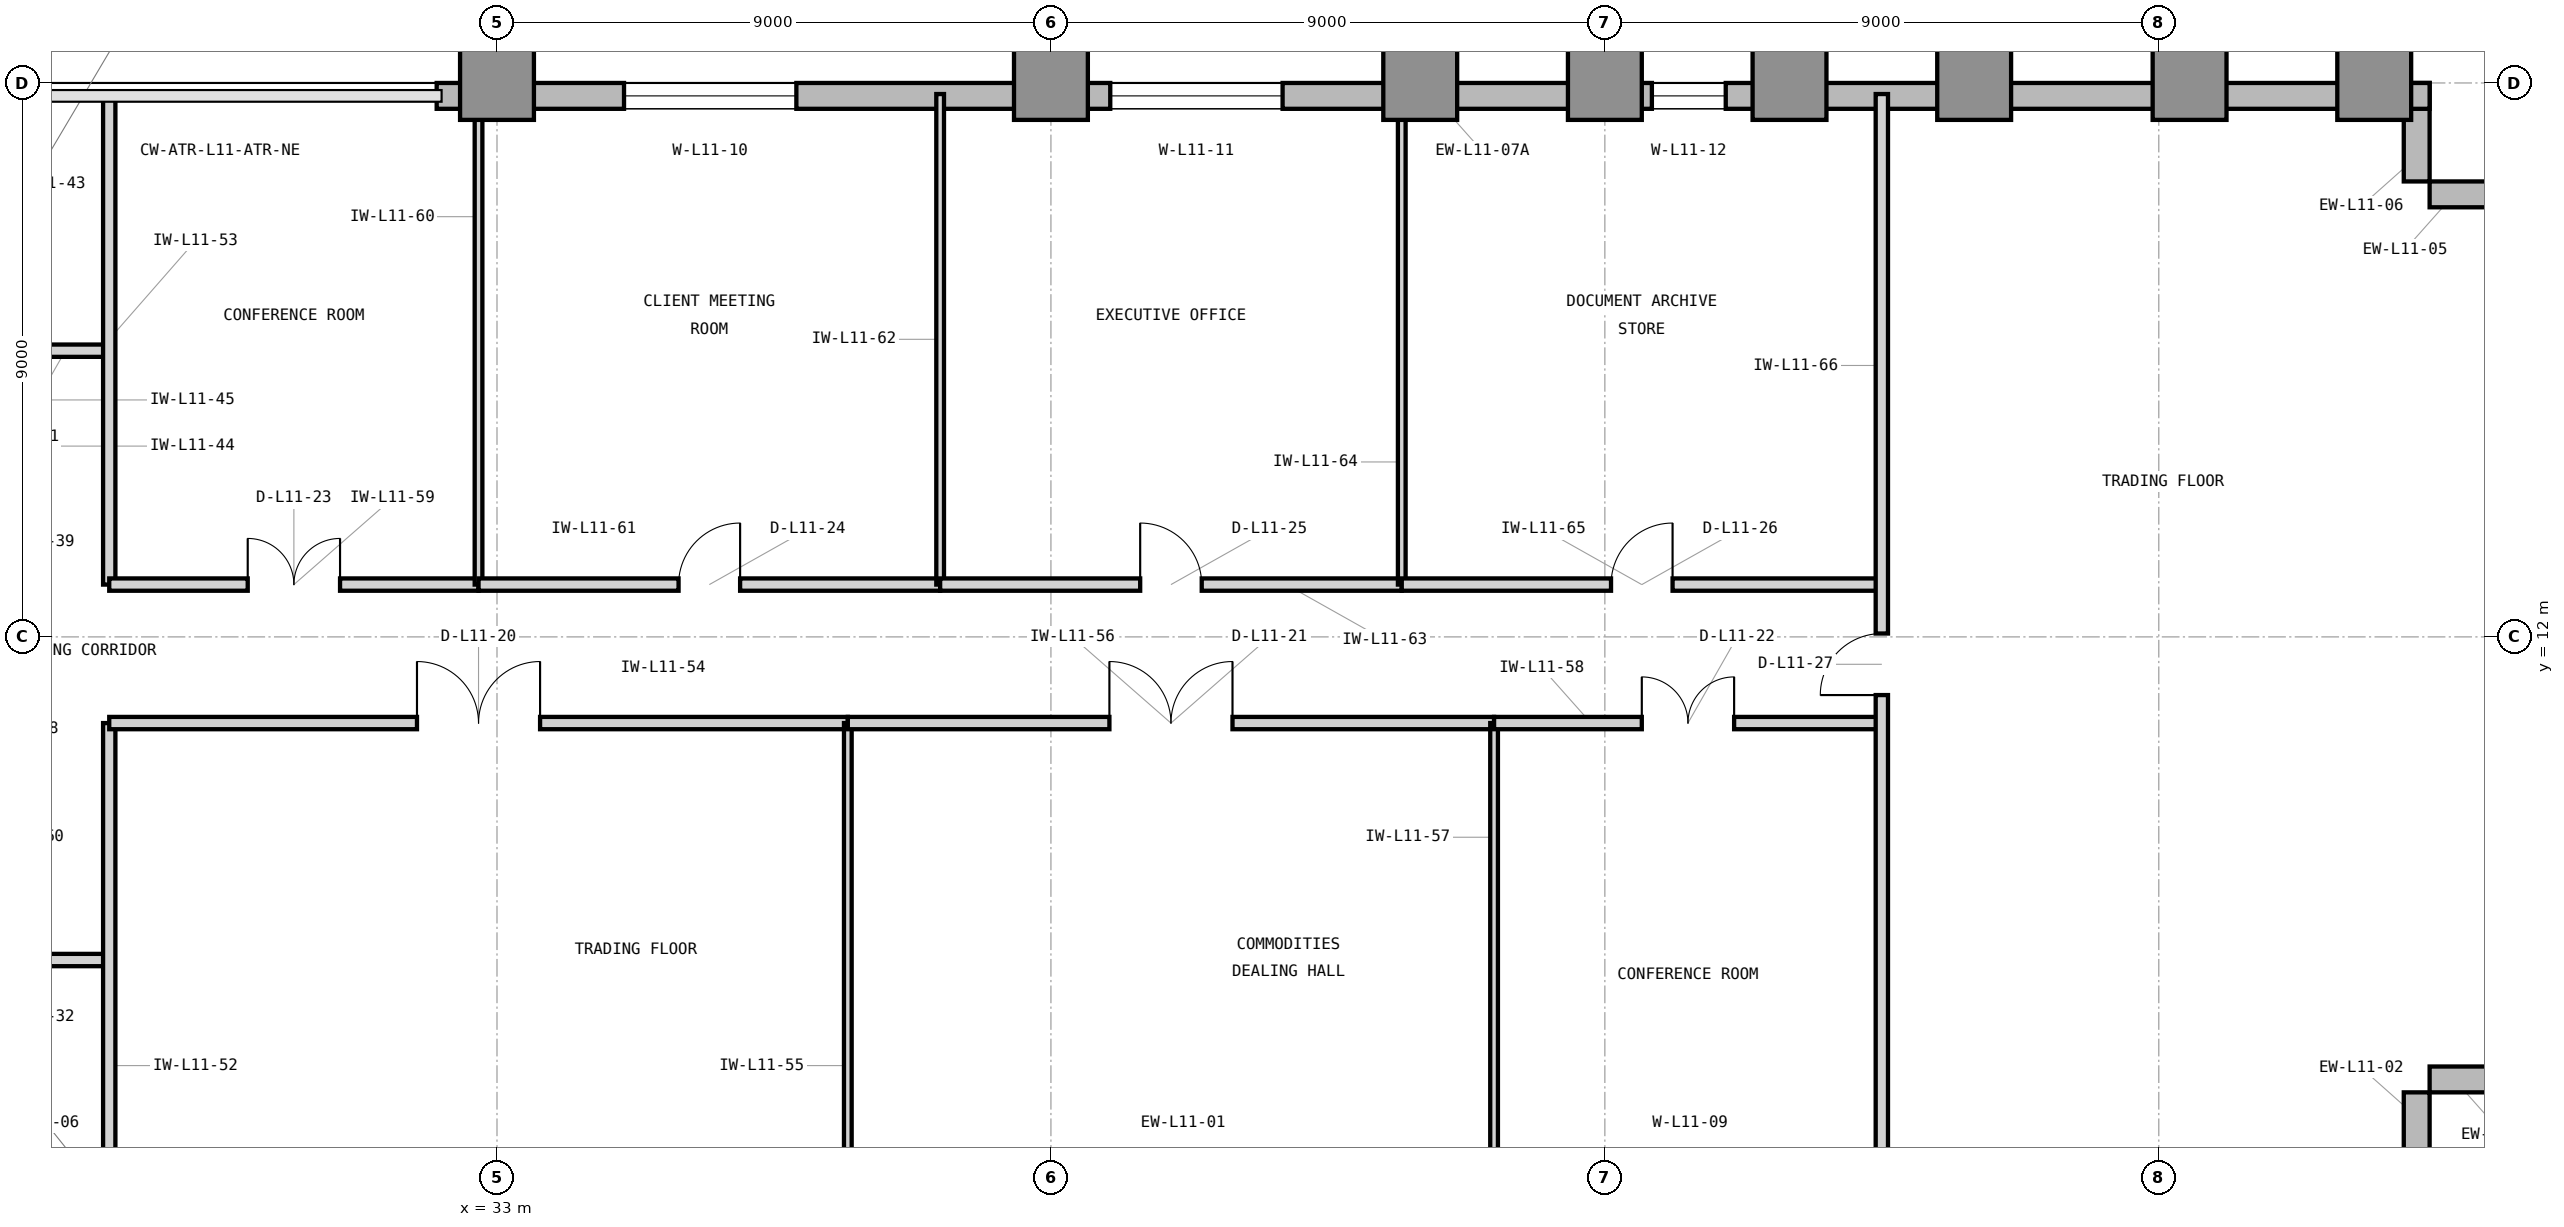
"""IFC4 building model, lengths in metres.
Left out: names, types, materials, properties, quantities, classifications, styles, units other than length and angle.
Written with IfcOpenShell. Run it as: python <this file> out.ifc"""

import sys

from ifc_helpers import new_model, si_unit, direction, frame, frame_2d, origin, origin_2d, place, context, subcontext, project, spatial, rectangle, extrude, element, fill, save


model = new_model("IFC4")
c1 = context("Model", 3, precision=1e-05, world=origin(), true_north=direction((0.0, 1.0)))
c2 = subcontext(c1, "Body", "Model", "MODEL_VIEW")
j1 = project(units=[si_unit("LENGTHUNIT", "METRE"), si_unit("PLANEANGLEUNIT", "RADIAN")], contexts=[c1])
p1 = place(None, origin())
s1 = spatial("IfcSite", under=j1, at=p1, CompositionType="ELEMENT")
p2 = place(p1, origin())
s2 = spatial("IfcBuilding", under=s1, at=p2, CompositionType="ELEMENT")
p3 = place(p2, frame((0.0, 0.0, 51.0)))
s3 = spatial("IfcBuildingStorey", under=s2, at=p3, CompositionType="ELEMENT", Elevation=51.0)
for number, where, z_axis, x_axis in (
    (1, (33.0, 21.0, 0.0), (0.0, 0.0, 1.0), (1.0, 0.0, 0.0)),
    (2, (42.0, 21.0, 0.0), (0.0, 0.0, 1.0), (1.0, 0.0, 0.0)),
    (3, (48.0, 21.0, 0.0), (0.0, 0.0, 1.0), (1.0, 0.0, 0.0)),
    (4, (51.0, 21.0, 0.0), (0.0, 0.0, 1.0), (1.0, 0.0, 0.0)),
    (5, (54.0, 21.0, 0.0), (0.0, 0.0, 1.0), (1.0, 0.0, 0.0)),
    (6, (57.0, 21.0, 0.0), (0.0, 0.0, 1.0), (1.0, 0.0, 0.0)),
    (7, (60.5, 21.0, 0.0), (0.0, 0.0, 1.0), (1.0, 0.0, 0.0)),
    (8, (63.5, 21.0, 0.0), (0.0, 0.0, 1.0), (1.0, 0.0, 0.0)),
):
    element("IfcColumn", number, at=place(p3, frame(where, z_axis=z_axis, x_axis=x_axis)), inside=s3, PredefinedType="COLUMN", context=c2, shape_type="SweptSolid", body=[
        extrude(rectangle(XDim=1.2, YDim=1.2, at=origin_2d()), origin(), (0.0, 0.0, 1.0), 4.2),
    ])
for number, where, z_axis, x_axis in (
    (9, (64.19, 3.0, 0.0), (0.0, 0.0, 1.0), (0.0, 1.0, 0.0)),
    (10, (64.4, 4.81, 0.0), (0.0, 0.0, 1.0), (1.0, 0.0, 0.0)),
    (11, (66.0, 19.19, 0.0), (0.0, 0.0, 1.0), (-1.0, 0.0, 0.0)),
    (12, (64.19, 19.4, 0.0), (0.0, 0.0, 1.0), (0.0, 1.0, 0.0)),
):
    element("IfcWall", number, at=place(p3, frame(where, z_axis=z_axis, x_axis=x_axis)), inside=s3, PredefinedType="STANDARD", context=c2, shape_type="SweptSolid", body=[
        extrude(rectangle(XDim=1.6, YDim=0.42, at=frame_2d((0.8, 0.0))), origin(), (0.0, 0.0, 1.0), 3.98),
    ])
p4 = place(p3, frame((64.4, 20.79, 0.0), z_axis=(0.0, 0.0, 1.0), x_axis=(-1.0, 0.0, 0.0)))
e13 = element("IfcWall", 13, at=p4, inside=s3, PredefinedType="STANDARD", context=c2, shape_type="SweptSolid", body=[
    extrude(rectangle(XDim=32.38, YDim=0.42, at=frame_2d((16.19, 0.0))), origin(), (0.0, 0.0, 1.0), 3.98),
])
p5 = place(p4, frame((26.536, 0.0, 0.85)))
e14 = element("IfcOpeningElement", 14, at=p5, cuts=e13, PredefinedType="OPENING", context=c2, shape_type="SweptSolid", body=[
    extrude(rectangle(XDim=2.8, YDim=2.45, at=frame_2d((1.4, 1.225))), frame((0.0, 0.22, 0.0), z_axis=(0.0, -1.0, 0.0), x_axis=(1.0, 0.0, 0.0)), (0.0, 0.0, 1.0), 0.44),
])
p6 = place(p4, frame((18.636, 0.0, 0.85)))
e15 = element("IfcOpeningElement", 15, at=p6, cuts=e13, PredefinedType="OPENING", context=c2, shape_type="SweptSolid", body=[
    extrude(rectangle(XDim=2.8, YDim=2.45, at=frame_2d((1.4, 1.225))), frame((0.0, 0.22, 0.0), z_axis=(0.0, -1.0, 0.0), x_axis=(1.0, 0.0, 0.0)), (0.0, 0.0, 1.0), 0.44),
])
p7 = place(p4, frame((11.436, 0.0, 0.85)))
e16 = element("IfcOpeningElement", 16, at=p7, cuts=e13, PredefinedType="OPENING", context=c2, shape_type="SweptSolid", body=[
    extrude(rectangle(XDim=1.2, YDim=2.45, at=frame_2d((0.6, 1.225))), frame((0.0, 0.22, 0.0), z_axis=(0.0, -1.0, 0.0), x_axis=(1.0, 0.0, 0.0)), (0.0, 0.0, 1.0), 0.44),
])
p8 = place(p3, frame((23.85, 6.75, 0.0), z_axis=(0.0, 0.0, 1.0), x_axis=(1.0, 0.0, 0.0)))
e17 = element("IfcWall", 17, at=p8, inside=s3, PredefinedType="PARTITIONING", context=c2, shape_type="SweptSolid", body=[
    extrude(rectangle(XDim=2.85, YDim=0.2, at=frame_2d((1.425, 0.0))), origin(), (0.0, 0.0, 1.0), 3.97),
])
p9 = place(p8, frame((0.7, 0.0, 0.0)))
e18 = element("IfcOpeningElement", 18, at=p9, cuts=e17, PredefinedType="OPENING", context=c2, shape_type="SweptSolid", body=[
    extrude(rectangle(XDim=1.0, YDim=2.15, at=frame_2d((0.5, 1.075))), frame((0.0, 0.11, 0.0), z_axis=(0.0, -1.0, 0.0), x_axis=(1.0, 0.0, 0.0)), (0.0, 0.0, 1.0), 0.22),
])
p10 = place(p3, frame((23.85, 16.65, 0.0), z_axis=(0.0, 0.0, 1.0), x_axis=(1.0, 0.0, 0.0)))
e19 = element("IfcWall", 19, at=p10, inside=s3, PredefinedType="PARTITIONING", context=c2, shape_type="SweptSolid", body=[
    extrude(rectangle(XDim=2.85, YDim=0.2, at=frame_2d((1.425, 0.0))), origin(), (0.0, 0.0, 1.0), 3.97),
])
p11 = place(p10, frame((0.7, 0.0, 0.0)))
e20 = element("IfcOpeningElement", 20, at=p11, cuts=e19, PredefinedType="OPENING", context=c2, shape_type="SweptSolid", body=[
    extrude(rectangle(XDim=1.0, YDim=2.15, at=frame_2d((0.5, 1.075))), frame((0.0, 0.11, 0.0), z_axis=(0.0, -1.0, 0.0), x_axis=(1.0, 0.0, 0.0)), (0.0, 0.0, 1.0), 0.22),
])
p12 = place(p3, frame((26.7, 3.18, 0.0), z_axis=(0.0, 0.0, 1.0), x_axis=(0.0, 1.0, 0.0)))
e21 = element("IfcWall", 21, at=p12, inside=s3, PredefinedType="PARTITIONING", context=c2, shape_type="SweptSolid", body=[
    extrude(rectangle(XDim=7.42, YDim=0.2, at=frame_2d((3.71, 0.0))), origin(), (0.0, 0.0, 1.0), 3.97),
])
p13 = place(p3, frame((26.7, 12.85, 0.0), z_axis=(0.0, 0.0, 1.0), x_axis=(0.0, 1.0, 0.0)))
e22 = element("IfcWall", 22, at=p13, inside=s3, PredefinedType="PARTITIONING", context=c2, shape_type="SweptSolid", body=[
    extrude(rectangle(XDim=7.97, YDim=0.2, at=frame_2d((3.985, 0.0))), origin(), (0.0, 0.0, 1.0), 3.97),
])
p14 = place(p3, frame((26.7, 10.6, 0.0), z_axis=(0.0, 0.0, 1.0), x_axis=(1.0, 0.0, 0.0)))
e23 = element("IfcWall", 23, at=p14, inside=s3, PredefinedType="PARTITIONING", context=c2, shape_type="SweptSolid", body=[
    extrude(rectangle(XDim=12.0, YDim=0.2, at=frame_2d((6.0, 0.0))), origin(), (0.0, 0.0, 1.0), 3.97),
])
p15 = place(p14, frame((5.0, 0.0, 0.0)))
e24 = element("IfcOpeningElement", 24, at=p15, cuts=e23, PredefinedType="OPENING", context=c2, shape_type="SweptSolid", body=[
    extrude(rectangle(XDim=2.0, YDim=2.5, at=frame_2d((1.0, 1.25))), frame((0.0, 0.11, 0.0), z_axis=(0.0, -1.0, 0.0), x_axis=(1.0, 0.0, 0.0)), (0.0, 0.0, 1.0), 0.22),
])
p16 = place(p3, frame((38.7, 3.18, 0.0), z_axis=(0.0, 0.0, 1.0), x_axis=(0.0, 1.0, 0.0)))
e25 = element("IfcWall", 25, at=p16, inside=s3, PredefinedType="PARTITIONING", context=c2, shape_type="SweptSolid", body=[
    extrude(rectangle(XDim=7.42, YDim=0.125, at=frame_2d((3.71, 0.0))), origin(), (0.0, 0.0, 1.0), 3.97),
])
p17 = place(p3, frame((38.7, 10.6, 0.0), z_axis=(0.0, 0.0, 1.0), x_axis=(1.0, 0.0, 0.0)))
e26 = element("IfcWall", 26, at=p17, inside=s3, PredefinedType="PARTITIONING", context=c2, shape_type="SweptSolid", body=[
    extrude(rectangle(XDim=10.5, YDim=0.2, at=frame_2d((5.25, 0.0))), origin(), (0.0, 0.0, 1.0), 3.97),
])
p18 = place(p17, frame((4.25, 0.0, 0.0)))
e27 = element("IfcOpeningElement", 27, at=p18, cuts=e26, PredefinedType="OPENING", context=c2, shape_type="SweptSolid", body=[
    extrude(rectangle(XDim=2.0, YDim=2.5, at=frame_2d((1.0, 1.25))), frame((0.0, 0.11, 0.0), z_axis=(0.0, -1.0, 0.0), x_axis=(1.0, 0.0, 0.0)), (0.0, 0.0, 1.0), 0.22),
])
p19 = place(p3, frame((49.2, 3.18, 0.0), z_axis=(0.0, 0.0, 1.0), x_axis=(0.0, 1.0, 0.0)))
e28 = element("IfcWall", 28, at=p19, inside=s3, PredefinedType="PARTITIONING", context=c2, shape_type="SweptSolid", body=[
    extrude(rectangle(XDim=7.42, YDim=0.125, at=frame_2d((3.71, 0.0))), origin(), (0.0, 0.0, 1.0), 3.97),
])
p20 = place(p3, frame((49.2, 10.6, 0.0), z_axis=(0.0, 0.0, 1.0), x_axis=(1.0, 0.0, 0.0)))
e29 = element("IfcWall", 29, at=p20, inside=s3, PredefinedType="PARTITIONING", context=c2, shape_type="SweptSolid", body=[
    extrude(rectangle(XDim=6.3, YDim=0.2, at=frame_2d((3.15, 0.0))), origin(), (0.0, 0.0, 1.0), 3.97),
])
p21 = place(p20, frame((2.4, 0.0, 0.0)))
e30 = element("IfcOpeningElement", 30, at=p21, cuts=e29, PredefinedType="OPENING", context=c2, shape_type="SweptSolid", body=[
    extrude(rectangle(XDim=1.5, YDim=2.3, at=frame_2d((0.75, 1.15))), frame((0.0, 0.11, 0.0), z_axis=(0.0, -1.0, 0.0), x_axis=(1.0, 0.0, 0.0)), (0.0, 0.0, 1.0), 0.22),
])
p22 = place(p3, frame((26.7, 12.85, 0.0), z_axis=(0.0, 0.0, 1.0), x_axis=(1.0, 0.0, 0.0)))
e31 = element("IfcWall", 31, at=p22, inside=s3, PredefinedType="PARTITIONING", context=c2, shape_type="SweptSolid", body=[
    extrude(rectangle(XDim=6.0, YDim=0.2, at=frame_2d((3.0, 0.0))), origin(), (0.0, 0.0, 1.0), 3.97),
])
p23 = place(p22, frame((2.25, 0.0, 0.0)))
e32 = element("IfcOpeningElement", 32, at=p23, cuts=e31, PredefinedType="OPENING", context=c2, shape_type="SweptSolid", body=[
    extrude(rectangle(XDim=1.5, YDim=2.3, at=frame_2d((0.75, 1.15))), frame((0.0, 0.11, 0.0), z_axis=(0.0, -1.0, 0.0), x_axis=(1.0, 0.0, 0.0)), (0.0, 0.0, 1.0), 0.22),
])
p24 = place(p3, frame((32.7, 12.85, 0.0), z_axis=(0.0, 0.0, 1.0), x_axis=(0.0, 1.0, 0.0)))
e33 = element("IfcWall", 33, at=p24, inside=s3, PredefinedType="PARTITIONING", context=c2, shape_type="SweptSolid", body=[
    extrude(rectangle(XDim=7.97, YDim=0.125, at=frame_2d((3.985, 0.0))), origin(), (0.0, 0.0, 1.0), 3.97),
])
p25 = place(p3, frame((32.7, 12.85, 0.0), z_axis=(0.0, 0.0, 1.0), x_axis=(1.0, 0.0, 0.0)))
e34 = element("IfcWall", 34, at=p25, inside=s3, PredefinedType="PARTITIONING", context=c2, shape_type="SweptSolid", body=[
    extrude(rectangle(XDim=7.5, YDim=0.2, at=frame_2d((3.75, 0.0))), origin(), (0.0, 0.0, 1.0), 3.97),
])
p26 = place(p25, frame((3.25, 0.0, 0.0)))
e35 = element("IfcOpeningElement", 35, at=p26, cuts=e34, PredefinedType="OPENING", context=c2, shape_type="SweptSolid", body=[
    extrude(rectangle(XDim=1.0, YDim=2.15, at=frame_2d((0.5, 1.075))), frame((0.0, 0.11, 0.0), z_axis=(0.0, -1.0, 0.0), x_axis=(1.0, 0.0, 0.0)), (0.0, 0.0, 1.0), 0.22),
])
p27 = place(p3, frame((40.2, 12.85, 0.0), z_axis=(0.0, 0.0, 1.0), x_axis=(0.0, 1.0, 0.0)))
e36 = element("IfcWall", 36, at=p27, inside=s3, PredefinedType="PARTITIONING", context=c2, shape_type="SweptSolid", body=[
    extrude(rectangle(XDim=7.97, YDim=0.125, at=frame_2d((3.985, 0.0))), origin(), (0.0, 0.0, 1.0), 3.97),
])
p28 = place(p3, frame((40.2, 12.85, 0.0), z_axis=(0.0, 0.0, 1.0), x_axis=(1.0, 0.0, 0.0)))
e37 = element("IfcWall", 37, at=p28, inside=s3, PredefinedType="PARTITIONING", context=c2, shape_type="SweptSolid", body=[
    extrude(rectangle(XDim=7.5, YDim=0.2, at=frame_2d((3.75, 0.0))), origin(), (0.0, 0.0, 1.0), 3.97),
])
p29 = place(p28, frame((3.25, 0.0, 0.0)))
e38 = element("IfcOpeningElement", 38, at=p29, cuts=e37, PredefinedType="OPENING", context=c2, shape_type="SweptSolid", body=[
    extrude(rectangle(XDim=1.0, YDim=2.15, at=frame_2d((0.5, 1.075))), frame((0.0, 0.11, 0.0), z_axis=(0.0, -1.0, 0.0), x_axis=(1.0, 0.0, 0.0)), (0.0, 0.0, 1.0), 0.22),
])
p30 = place(p3, frame((47.7, 12.85, 0.0), z_axis=(0.0, 0.0, 1.0), x_axis=(0.0, 1.0, 0.0)))
e39 = element("IfcWall", 39, at=p30, inside=s3, PredefinedType="PARTITIONING", context=c2, shape_type="SweptSolid", body=[
    extrude(rectangle(XDim=7.97, YDim=0.125, at=frame_2d((3.985, 0.0))), origin(), (0.0, 0.0, 1.0), 3.97),
])
p31 = place(p3, frame((47.7, 12.85, 0.0), z_axis=(0.0, 0.0, 1.0), x_axis=(1.0, 0.0, 0.0)))
e40 = element("IfcWall", 40, at=p31, inside=s3, PredefinedType="PARTITIONING", context=c2, shape_type="SweptSolid", body=[
    extrude(rectangle(XDim=7.8, YDim=0.2, at=frame_2d((3.9, 0.0))), origin(), (0.0, 0.0, 1.0), 3.97),
])
p32 = place(p31, frame((3.4, 0.0, 0.0)))
e41 = element("IfcOpeningElement", 41, at=p32, cuts=e40, PredefinedType="OPENING", context=c2, shape_type="SweptSolid", body=[
    extrude(rectangle(XDim=1.0, YDim=2.15, at=frame_2d((0.5, 1.075))), frame((0.0, 0.11, 0.0), z_axis=(0.0, -1.0, 0.0), x_axis=(1.0, 0.0, 0.0)), (0.0, 0.0, 1.0), 0.22),
])
p33 = place(p3, frame((55.5, 3.18, 0.0), z_axis=(0.0, 0.0, 1.0), x_axis=(0.0, 1.0, 0.0)))
e42 = element("IfcWall", 42, at=p33, inside=s3, PredefinedType="PARTITIONING", context=c2, shape_type="SweptSolid", body=[
    extrude(rectangle(XDim=17.64, YDim=0.2, at=frame_2d((8.82, 0.0))), origin(), (0.0, 0.0, 1.0), 3.97),
])
p34 = place(p33, frame((7.875, 0.0, 0.0)))
e43 = element("IfcOpeningElement", 43, at=p34, cuts=e42, PredefinedType="OPENING", context=c2, shape_type="SweptSolid", body=[
    extrude(rectangle(XDim=1.0, YDim=2.15, at=frame_2d((0.5, 1.075))), frame((0.0, 0.11, 0.0), z_axis=(0.0, -1.0, 0.0), x_axis=(1.0, 0.0, 0.0)), (0.0, 0.0, 1.0), 0.22),
])
p35 = place(p15, origin())
e44 = element("IfcDoor", 44, at=p35, inside=s3, OperationType="DOUBLE_DOOR_SINGLE_SWING", PredefinedType="DOOR", context=c2, shape_type="SweptSolid", body=[
    extrude(rectangle(XDim=2.0, YDim=2.5, at=frame_2d((1.0, 1.25))), frame((0.0, 0.025, 0.0), z_axis=(0.0, -1.0, 0.0), x_axis=(1.0, 0.0, 0.0)), (0.0, 0.0, 1.0), 0.05),
])
fill(e24, e44)
p36 = place(p18, origin())
e45 = element("IfcDoor", 45, at=p36, inside=s3, OperationType="DOUBLE_DOOR_SINGLE_SWING", PredefinedType="DOOR", context=c2, shape_type="SweptSolid", body=[
    extrude(rectangle(XDim=2.0, YDim=2.5, at=frame_2d((1.0, 1.25))), frame((0.0, 0.025, 0.0), z_axis=(0.0, -1.0, 0.0), x_axis=(1.0, 0.0, 0.0)), (0.0, 0.0, 1.0), 0.05),
])
fill(e27, e45)
p37 = place(p21, origin())
e46 = element("IfcDoor", 46, at=p37, inside=s3, OperationType="DOUBLE_DOOR_SINGLE_SWING", PredefinedType="DOOR", context=c2, shape_type="SweptSolid", body=[
    extrude(rectangle(XDim=1.5, YDim=2.3, at=frame_2d((0.75, 1.15))), frame((0.0, 0.025, 0.0), z_axis=(0.0, -1.0, 0.0), x_axis=(1.0, 0.0, 0.0)), (0.0, 0.0, 1.0), 0.05),
])
fill(e30, e46)
p38 = place(p23, origin())
e47 = element("IfcDoor", 47, at=p38, inside=s3, OperationType="DOUBLE_DOOR_SINGLE_SWING", PredefinedType="DOOR", context=c2, shape_type="SweptSolid", body=[
    extrude(rectangle(XDim=1.5, YDim=2.3, at=frame_2d((0.75, 1.15))), frame((0.0, 0.025, 0.0), z_axis=(0.0, -1.0, 0.0), x_axis=(1.0, 0.0, 0.0)), (0.0, 0.0, 1.0), 0.05),
])
fill(e32, e47)
p39 = place(p26, origin())
e48 = element("IfcDoor", 48, at=p39, inside=s3, OperationType="SINGLE_SWING_RIGHT", PredefinedType="DOOR", context=c2, shape_type="SweptSolid", body=[
    extrude(rectangle(XDim=1.0, YDim=2.15, at=frame_2d((0.5, 1.075))), frame((0.0, 0.025, 0.0), z_axis=(0.0, -1.0, 0.0), x_axis=(1.0, 0.0, 0.0)), (0.0, 0.0, 1.0), 0.05),
])
fill(e35, e48)
p40 = place(p29, origin())
e49 = element("IfcDoor", 49, at=p40, inside=s3, OperationType="SINGLE_SWING_LEFT", PredefinedType="DOOR", context=c2, shape_type="SweptSolid", body=[
    extrude(rectangle(XDim=1.0, YDim=2.15, at=frame_2d((0.5, 1.075))), frame((0.0, 0.025, 0.0), z_axis=(0.0, -1.0, 0.0), x_axis=(1.0, 0.0, 0.0)), (0.0, 0.0, 1.0), 0.05),
])
fill(e38, e49)
p41 = place(p32, origin())
e50 = element("IfcDoor", 50, at=p41, inside=s3, OperationType="SINGLE_SWING_RIGHT", PredefinedType="DOOR", context=c2, shape_type="SweptSolid", body=[
    extrude(rectangle(XDim=1.0, YDim=2.15, at=frame_2d((0.5, 1.075))), frame((0.0, 0.025, 0.0), z_axis=(0.0, -1.0, 0.0), x_axis=(1.0, 0.0, 0.0)), (0.0, 0.0, 1.0), 0.05),
])
fill(e41, e50)
p42 = place(p34, origin())
e51 = element("IfcDoor", 51, at=p42, inside=s3, OperationType="SINGLE_SWING_LEFT", PredefinedType="DOOR", context=c2, shape_type="SweptSolid", body=[
    extrude(rectangle(XDim=1.0, YDim=2.15, at=frame_2d((0.5, 1.075))), frame((0.0, 0.025, 0.0), z_axis=(0.0, -1.0, 0.0), x_axis=(1.0, 0.0, 0.0)), (0.0, 0.0, 1.0), 0.05),
])
fill(e43, e51)
p43 = place(p5, origin())
e52 = element("IfcWindow", 52, at=p43, inside=s3, PartitioningType="SINGLE_PANEL", PredefinedType="WINDOW", context=c2, shape_type="SweptSolid", body=[
    extrude(rectangle(XDim=2.8, YDim=2.45, at=frame_2d((1.4, 1.225))), frame((0.0, 0.11, 0.0), z_axis=(0.0, -1.0, 0.0), x_axis=(1.0, 0.0, 0.0)), (0.0, 0.0, 1.0), 0.06),
])
fill(e14, e52)
p44 = place(p6, origin())
e53 = element("IfcWindow", 53, at=p44, inside=s3, PartitioningType="SINGLE_PANEL", PredefinedType="WINDOW", context=c2, shape_type="SweptSolid", body=[
    extrude(rectangle(XDim=2.8, YDim=2.45, at=frame_2d((1.4, 1.225))), frame((0.0, 0.11, 0.0), z_axis=(0.0, -1.0, 0.0), x_axis=(1.0, 0.0, 0.0)), (0.0, 0.0, 1.0), 0.06),
])
fill(e15, e53)
p45 = place(p7, origin())
e54 = element("IfcWindow", 54, at=p45, inside=s3, PartitioningType="SINGLE_PANEL", PredefinedType="WINDOW", context=c2, shape_type="SweptSolid", body=[
    extrude(rectangle(XDim=1.2, YDim=2.45, at=frame_2d((0.6, 1.225))), frame((0.0, 0.11, 0.0), z_axis=(0.0, -1.0, 0.0), x_axis=(1.0, 0.0, 0.0)), (0.0, 0.0, 1.0), 0.06),
])
fill(e16, e54)
save(model, sys.argv[1])
